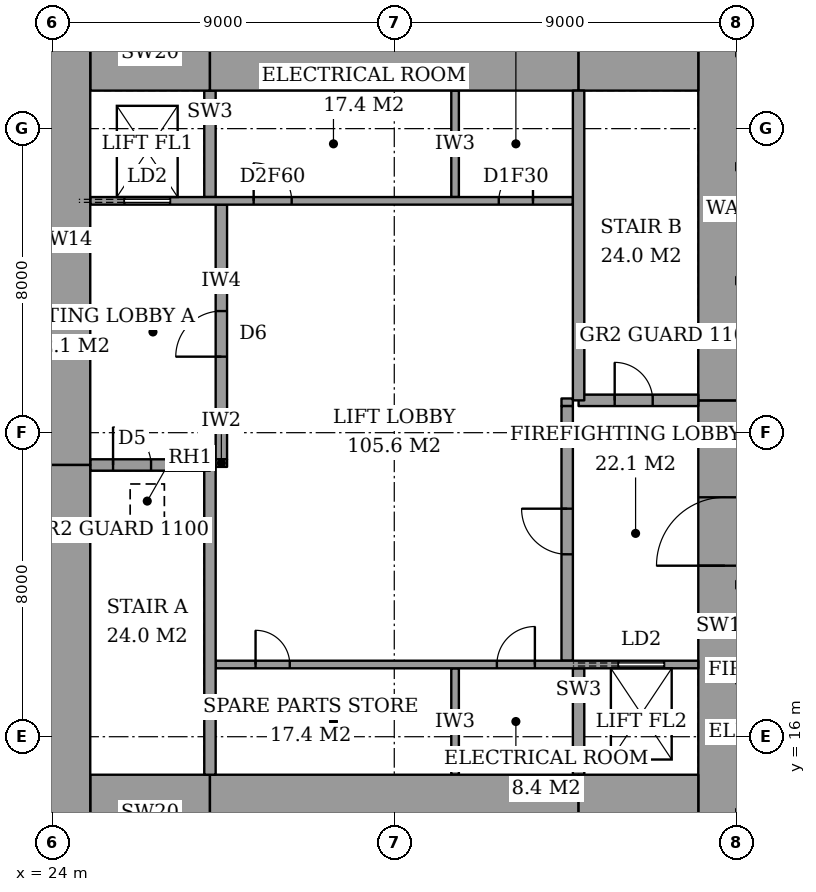
"""IFC4 building model, lengths in metres.
Left out: names, types, materials, properties, quantities, classifications, styles, units other than length and angle.
Written with IfcOpenShell. Run it as: python <this file> out.ifc"""

import sys

from ifc_helpers import new_model, si_unit, direction, frame, frame_2d, origin, origin_2d, place, context, subcontext, project, spatial, rectangle, extrude, element, fill, save


model = new_model("IFC4")
c1 = context("Model", 3, precision=1e-05, world=origin(), true_north=direction((0.0, 1.0)))
c2 = subcontext(c1, "Body", "Model", "MODEL_VIEW")
j1 = project(units=[si_unit("LENGTHUNIT", "METRE"), si_unit("PLANEANGLEUNIT", "RADIAN")], contexts=[c1])
p1 = place(None, origin())
s1 = spatial("IfcSite", under=j1, at=p1, CompositionType="ELEMENT")
p2 = place(p1, origin())
s2 = spatial("IfcBuilding", under=s1, at=p2, CompositionType="ELEMENT")
p3 = place(p2, frame((0.0, 0.0, 296.6)))
s3 = spatial("IfcBuildingStorey", under=s2, at=p3, CompositionType="ELEMENT", Elevation=296.6)
p4 = place(p3, frame((25.0, 14.0, 0.0), z_axis=(0.0, 0.0, 1.0), x_axis=(1.0, 0.0, 0.0)))
e1 = element("IfcWall", 1, at=p4, inside=s3, PredefinedType="SHEAR", context=c2, shape_type="SweptSolid", body=[
    extrude(rectangle(XDim=3.15, YDim=2.0, at=frame_2d((1.575, 0.0))), origin(), (0.0, 0.0, 1.0), 5.0),
])
p5 = place(p3, frame((28.15, 14.0, 0.0), z_axis=(0.0, 0.0, 1.0), x_axis=(1.0, 0.0, 0.0)))
e2 = element("IfcWall", 2, at=p5, inside=s3, PredefinedType="SHEAR", context=c2, shape_type="SweptSolid", body=[
    extrude(rectangle(XDim=9.7, YDim=2.0, at=frame_2d((4.85, 0.0))), origin(), (0.0, 0.0, 1.0), 5.0),
])
for number, where, z_axis, x_axis in (
    (3, (37.85, 14.0, 0.0), (0.0, 0.0, 1.0), (1.0, 0.0, 0.0)),
    (4, (25.0, 34.0, 0.0), (0.0, 0.0, 1.0), (1.0, 0.0, 0.0)),
):
    element("IfcWall", number, at=place(p3, frame(where, z_axis=z_axis, x_axis=x_axis)), inside=s3, PredefinedType="SHEAR", context=c2, shape_type="SweptSolid", body=[
        extrude(rectangle(XDim=3.15, YDim=2.0, at=frame_2d((1.575, 0.0))), origin(), (0.0, 0.0, 1.0), 5.0),
    ])
p6 = place(p3, frame((28.15, 34.0, 0.0), z_axis=(0.0, 0.0, 1.0), x_axis=(1.0, 0.0, 0.0)))
e5 = element("IfcWall", 5, at=p6, inside=s3, PredefinedType="SHEAR", context=c2, shape_type="SweptSolid", body=[
    extrude(rectangle(XDim=9.7, YDim=2.0, at=frame_2d((4.85, 0.0))), origin(), (0.0, 0.0, 1.0), 5.0),
])
p7 = place(p3, frame((37.85, 34.0, 0.0), z_axis=(0.0, 0.0, 1.0), x_axis=(1.0, 0.0, 0.0)))
e6 = element("IfcWall", 6, at=p7, inside=s3, PredefinedType="SHEAR", context=c2, shape_type="SweptSolid", body=[
    extrude(rectangle(XDim=3.15, YDim=2.0, at=frame_2d((1.575, 0.0))), origin(), (0.0, 0.0, 1.0), 5.0),
])
p8 = place(p3, frame((24.3, 13.0, 0.0), z_axis=(0.0, 0.0, 1.0), x_axis=(0.0, 1.0, 0.0)))
e7 = element("IfcWall", 7, at=p8, inside=s3, PredefinedType="SHEAR", context=c2, shape_type="SweptSolid", body=[
    extrude(rectangle(XDim=10.15, YDim=1.4, at=frame_2d((5.075, 0.0))), origin(), (0.0, 0.0, 1.0), 5.0),
])
p9 = place(p3, frame((24.3, 23.15, 0.0), z_axis=(0.0, 0.0, 1.0), x_axis=(0.0, 1.0, 0.0)))
e8 = element("IfcWall", 8, at=p9, inside=s3, PredefinedType="SHEAR", context=c2, shape_type="SweptSolid", body=[
    extrude(rectangle(XDim=11.85, YDim=1.4, at=frame_2d((5.925, 0.0))), origin(), (0.0, 0.0, 1.0), 5.0),
])
p10 = place(p3, frame((41.7, 13.0, 0.0), z_axis=(0.0, 0.0, 1.0), x_axis=(0.0, 1.0, 0.0)))
e9 = element("IfcWall", 9, at=p10, inside=s3, PredefinedType="SHEAR", context=c2, shape_type="SweptSolid", body=[
    extrude(rectangle(XDim=11.85, YDim=1.4, at=frame_2d((5.925, 0.0))), origin(), (0.0, 0.0, 1.0), 5.0),
])
p11 = place(p10, frame((7.5, 0.0, 0.0)))
e10 = element("IfcOpeningElement", 10, at=p11, cuts=e9, PredefinedType="OPENING", context=c2, shape_type="SweptSolid", body=[
    extrude(rectangle(XDim=1.8, YDim=2.4, at=frame_2d((0.9, 1.2))), frame((0.0, 0.71, 0.0), z_axis=(0.0, -1.0, 0.0), x_axis=(1.0, 0.0, 0.0)), (0.0, 0.0, 1.0), 1.42),
])
p12 = place(p3, frame((41.7, 24.85, 0.0), z_axis=(0.0, 0.0, 1.0), x_axis=(0.0, 1.0, 0.0)))
e11 = element("IfcWall", 11, at=p12, inside=s3, PredefinedType="SHEAR", context=c2, shape_type="SweptSolid", body=[
    extrude(rectangle(XDim=10.15, YDim=1.4, at=frame_2d((5.075, 0.0))), origin(), (0.0, 0.0, 1.0), 5.0),
])
p13 = place(p3, frame((28.15, 15.0, 0.0), z_axis=(0.0, 0.0, 1.0), x_axis=(0.0, 1.0, 0.0)))
e12 = element("IfcWall", 12, at=p13, inside=s3, PredefinedType="SHEAR", context=c2, shape_type="SweptSolid", body=[
    extrude(rectangle(XDim=8.15, YDim=0.3, at=frame_2d((4.075, 0.0))), origin(), (0.0, 0.0, 1.0), 5.0),
])
p14 = place(p3, frame((25.0, 23.15, 0.0), z_axis=(0.0, 0.0, 1.0), x_axis=(1.0, 0.0, 0.0)))
e13 = element("IfcWall", 13, at=p14, inside=s3, PredefinedType="SHEAR", context=c2, shape_type="SweptSolid", body=[
    extrude(rectangle(XDim=3.15, YDim=0.3, at=frame_2d((1.575, 0.0))), origin(), (0.0, 0.0, 1.0), 5.0),
])
p15 = place(p14, frame((0.6, 0.0, 0.0)))
e14 = element("IfcOpeningElement", 14, at=p15, cuts=e13, PredefinedType="OPENING", context=c2, shape_type="SweptSolid", body=[
    extrude(rectangle(XDim=1.0, YDim=2.1, at=frame_2d((0.5, 1.05))), frame((0.0, 0.16, 0.0), z_axis=(0.0, -1.0, 0.0), x_axis=(1.0, 0.0, 0.0)), (0.0, 0.0, 1.0), 0.32),
])
p16 = place(p3, frame((37.85, 24.85, 0.0), z_axis=(0.0, 0.0, 1.0), x_axis=(0.0, 1.0, 0.0)))
e15 = element("IfcWall", 15, at=p16, inside=s3, PredefinedType="SHEAR", context=c2, shape_type="SweptSolid", body=[
    extrude(rectangle(XDim=8.15, YDim=0.3, at=frame_2d((4.075, 0.0))), origin(), (0.0, 0.0, 1.0), 5.0),
])
p17 = place(p3, frame((37.85, 24.85, 0.0), z_axis=(0.0, 0.0, 1.0), x_axis=(1.0, 0.0, 0.0)))
e16 = element("IfcWall", 16, at=p17, inside=s3, PredefinedType="SHEAR", context=c2, shape_type="SweptSolid", body=[
    extrude(rectangle(XDim=3.15, YDim=0.3, at=frame_2d((1.575, 0.0))), origin(), (0.0, 0.0, 1.0), 5.0),
])
p18 = place(p17, frame((0.95, 0.0, 0.0)))
e17 = element("IfcOpeningElement", 17, at=p18, cuts=e16, PredefinedType="OPENING", context=c2, shape_type="SweptSolid", body=[
    extrude(rectangle(XDim=1.0, YDim=2.1, at=frame_2d((0.5, 1.05))), frame((0.0, 0.16, 0.0), z_axis=(0.0, -1.0, 0.0), x_axis=(1.0, 0.0, 0.0)), (0.0, 0.0, 1.0), 0.32),
])
p19 = place(p3, frame((28.45, 23.3, 0.0), z_axis=(0.0, 0.0, 1.0), x_axis=(0.0, 1.0, 0.0)))
e18 = element("IfcWall", 18, at=p19, inside=s3, PredefinedType="PARTITIONING", context=c2, shape_type="SweptSolid", body=[
    extrude(rectangle(XDim=6.7, YDim=0.3, at=frame_2d((3.35, 0.0))), origin(), (0.0, 0.0, 1.0), 5.0),
])
p20 = place(p19, frame((2.7, 0.0, 0.0)))
e19 = element("IfcOpeningElement", 19, at=p20, cuts=e18, PredefinedType="OPENING", context=c2, shape_type="SweptSolid", body=[
    extrude(rectangle(XDim=1.2, YDim=2.1, at=frame_2d((0.6, 1.05))), frame((0.0, 0.16, 0.0), z_axis=(0.0, -1.0, 0.0), x_axis=(1.0, 0.0, 0.0)), (0.0, 0.0, 1.0), 0.32),
])
p21 = place(p3, frame((37.55, 18.0, 0.0), z_axis=(0.0, 0.0, 1.0), x_axis=(0.0, 1.0, 0.0)))
e20 = element("IfcWall", 20, at=p21, inside=s3, PredefinedType="PARTITIONING", context=c2, shape_type="SweptSolid", body=[
    extrude(rectangle(XDim=6.7, YDim=0.3, at=frame_2d((3.35, 0.0))), origin(), (0.0, 0.0, 1.0), 5.0),
])
p22 = place(p21, frame((2.8, 0.0, 0.0)))
e21 = element("IfcOpeningElement", 21, at=p22, cuts=e20, PredefinedType="OPENING", context=c2, shape_type="SweptSolid", body=[
    extrude(rectangle(XDim=1.2, YDim=2.1, at=frame_2d((0.6, 1.05))), frame((0.0, 0.16, 0.0), z_axis=(0.0, -1.0, 0.0), x_axis=(1.0, 0.0, 0.0)), (0.0, 0.0, 1.0), 0.32),
])
p23 = place(p3, frame((28.3, 17.9, 0.0), z_axis=(0.0, 0.0, 1.0), x_axis=(1.0, 0.0, 0.0)))
e22 = element("IfcWall", 22, at=p23, inside=s3, PredefinedType="PARTITIONING", context=c2, shape_type="SweptSolid", body=[
    extrude(rectangle(XDim=12.7, YDim=0.2, at=frame_2d((6.35, 0.0))), origin(), (0.0, 0.0, 1.0), 5.0),
])
p24 = place(p23, frame((1.05, 0.0, 0.0)))
e23 = element("IfcOpeningElement", 23, at=p24, cuts=e22, PredefinedType="OPENING", context=c2, shape_type="SweptSolid", body=[
    extrude(rectangle(XDim=0.9, YDim=2.1, at=frame_2d((0.45, 1.05))), frame((0.0, 0.11, 0.0), z_axis=(0.0, -1.0, 0.0), x_axis=(1.0, 0.0, 0.0)), (0.0, 0.0, 1.0), 0.22),
])
p25 = place(p23, frame((7.4, 0.0, 0.0)))
e24 = element("IfcOpeningElement", 24, at=p25, cuts=e22, PredefinedType="OPENING", context=c2, shape_type="SweptSolid", body=[
    extrude(rectangle(XDim=1.0, YDim=2.1, at=frame_2d((0.5, 1.05))), frame((0.0, 0.11, 0.0), z_axis=(0.0, -1.0, 0.0), x_axis=(1.0, 0.0, 0.0)), (0.0, 0.0, 1.0), 0.22),
])
p26 = place(p23, frame((10.6, 0.0, 0.0)))
e25 = element("IfcOpeningElement", 25, at=p26, cuts=e22, PredefinedType="OPENING", context=c2, shape_type="SweptSolid", body=[
    extrude(rectangle(XDim=1.2, YDim=2.1, at=frame_2d((0.6, 1.05))), frame((0.0, 0.11, 0.0), z_axis=(0.0, -1.0, 0.0), x_axis=(1.0, 0.0, 0.0)), (0.0, 0.0, 1.0), 0.22),
])
p27 = place(p3, frame((25.0, 30.1, 0.0), z_axis=(0.0, 0.0, 1.0), x_axis=(1.0, 0.0, 0.0)))
e26 = element("IfcWall", 26, at=p27, inside=s3, PredefinedType="PARTITIONING", context=c2, shape_type="SweptSolid", body=[
    extrude(rectangle(XDim=12.7, YDim=0.2, at=frame_2d((6.35, 0.0))), origin(), (0.0, 0.0, 1.0), 5.0),
])
p28 = place(p27, frame((4.3, 0.0, 0.0)))
e27 = element("IfcOpeningElement", 27, at=p28, cuts=e26, PredefinedType="OPENING", context=c2, shape_type="SweptSolid", body=[
    extrude(rectangle(XDim=1.0, YDim=2.1, at=frame_2d((0.5, 1.05))), frame((0.0, 0.11, 0.0), z_axis=(0.0, -1.0, 0.0), x_axis=(1.0, 0.0, 0.0)), (0.0, 0.0, 1.0), 0.22),
])
p29 = place(p27, frame((10.75, 0.0, 0.0)))
e28 = element("IfcOpeningElement", 28, at=p29, cuts=e26, PredefinedType="OPENING", context=c2, shape_type="SweptSolid", body=[
    extrude(rectangle(XDim=0.9, YDim=2.1, at=frame_2d((0.45, 1.05))), frame((0.0, 0.11, 0.0), z_axis=(0.0, -1.0, 0.0), x_axis=(1.0, 0.0, 0.0)), (0.0, 0.0, 1.0), 0.22),
])
p30 = place(p27, frame((0.9, 0.0, 0.0)))
e29 = element("IfcOpeningElement", 29, at=p30, cuts=e26, PredefinedType="OPENING", context=c2, shape_type="SweptSolid", body=[
    extrude(rectangle(XDim=1.2, YDim=2.1, at=frame_2d((0.6, 1.05))), frame((0.0, 0.11, 0.0), z_axis=(0.0, -1.0, 0.0), x_axis=(1.0, 0.0, 0.0)), (0.0, 0.0, 1.0), 0.22),
])
p31 = place(p3, frame((34.6, 15.0, 0.0), z_axis=(0.0, 0.0, 1.0), x_axis=(0.0, 1.0, 0.0)))
e30 = element("IfcWall", 30, at=p31, inside=s3, PredefinedType="PARTITIONING", context=c2, shape_type="SweptSolid", body=[
    extrude(rectangle(XDim=2.8, YDim=0.2, at=frame_2d((1.4, 0.0))), origin(), (0.0, 0.0, 1.0), 5.0),
])
p32 = place(p3, frame((37.85, 15.0, 0.0), z_axis=(0.0, 0.0, 1.0), x_axis=(0.0, 1.0, 0.0)))
e31 = element("IfcWall", 31, at=p32, inside=s3, PredefinedType="SHEAR", context=c2, shape_type="SweptSolid", body=[
    extrude(rectangle(XDim=2.8, YDim=0.3, at=frame_2d((1.4, 0.0))), origin(), (0.0, 0.0, 1.0), 5.0),
])
p33 = place(p3, frame((34.6, 30.2, 0.0), z_axis=(0.0, 0.0, 1.0), x_axis=(0.0, 1.0, 0.0)))
e32 = element("IfcWall", 32, at=p33, inside=s3, PredefinedType="PARTITIONING", context=c2, shape_type="SweptSolid", body=[
    extrude(rectangle(XDim=2.8, YDim=0.2, at=frame_2d((1.4, 0.0))), origin(), (0.0, 0.0, 1.0), 5.0),
])
p34 = place(p3, frame((28.15, 30.2, 0.0), z_axis=(0.0, 0.0, 1.0), x_axis=(0.0, 1.0, 0.0)))
e33 = element("IfcWall", 33, at=p34, inside=s3, PredefinedType="SHEAR", context=c2, shape_type="SweptSolid", body=[
    extrude(rectangle(XDim=2.8, YDim=0.3, at=frame_2d((1.4, 0.0))), origin(), (0.0, 0.0, 1.0), 5.0),
])
for number, where, z_axis, x_axis in (
    (34, (28.3, 23.2, 0.0), (0.0, 0.0, 1.0), (1.0, 0.0, 0.0)),
    (35, (37.4, 24.8, 0.0), (0.0, 0.0, 1.0), (1.0, 0.0, 0.0)),
):
    element("IfcWall", number, at=place(p3, frame(where, z_axis=z_axis, x_axis=x_axis)), inside=s3, PredefinedType="PARTITIONING", context=c2, shape_type="SweptSolid", body=[
        extrude(rectangle(XDim=0.3, YDim=0.2, at=frame_2d((0.15, 0.0))), origin(), (0.0, 0.0, 1.0), 5.0),
    ])
p35 = place(p15, origin())
e36 = element("IfcDoor", 36, at=p35, inside=s3, OperationType="SINGLE_SWING_RIGHT", PredefinedType="DOOR", context=c2, shape_type="SweptSolid", body=[
    extrude(rectangle(XDim=1.0, YDim=2.1, at=frame_2d((0.5, 1.05))), frame((0.0, 0.025, 0.0), z_axis=(0.0, -1.0, 0.0), x_axis=(1.0, 0.0, 0.0)), (0.0, 0.0, 1.0), 0.05),
])
fill(e14, e36)
p36 = place(p18, origin())
e37 = element("IfcDoor", 37, at=p36, inside=s3, OperationType="SINGLE_SWING_RIGHT", PredefinedType="DOOR", context=c2, shape_type="SweptSolid", body=[
    extrude(rectangle(XDim=1.0, YDim=2.1, at=frame_2d((0.5, 1.05))), frame((0.0, 0.025, 0.0), z_axis=(0.0, -1.0, 0.0), x_axis=(1.0, 0.0, 0.0)), (0.0, 0.0, 1.0), 0.05),
])
fill(e17, e37)
p37 = place(p20, origin())
e38 = element("IfcDoor", 38, at=p37, inside=s3, OperationType="SINGLE_SWING_RIGHT", PredefinedType="DOOR", context=c2, shape_type="SweptSolid", body=[
    extrude(rectangle(XDim=1.2, YDim=2.1, at=frame_2d((0.6, 1.05))), frame((0.0, 0.025, 0.0), z_axis=(0.0, -1.0, 0.0), x_axis=(1.0, 0.0, 0.0)), (0.0, 0.0, 1.0), 0.05),
])
fill(e19, e38)
p38 = place(p22, origin())
e39 = element("IfcDoor", 39, at=p38, inside=s3, OperationType="SINGLE_SWING_LEFT", PredefinedType="DOOR", context=c2, shape_type="SweptSolid", body=[
    extrude(rectangle(XDim=1.2, YDim=2.1, at=frame_2d((0.6, 1.05))), frame((0.0, 0.025, 0.0), z_axis=(0.0, -1.0, 0.0), x_axis=(1.0, 0.0, 0.0)), (0.0, 0.0, 1.0), 0.05),
])
fill(e21, e39)
p39 = place(p11, origin())
e40 = element("IfcDoor", 40, at=p39, inside=s3, OperationType="DOUBLE_DOOR_DOUBLE_SWING", PredefinedType="DOOR", context=c2, shape_type="SweptSolid", body=[
    extrude(rectangle(XDim=1.8, YDim=2.4, at=frame_2d((0.9, 1.2))), frame((0.0, 0.025, 0.0), z_axis=(0.0, -1.0, 0.0), x_axis=(1.0, 0.0, 0.0)), (0.0, 0.0, 1.0), 0.05),
])
fill(e10, e40)
p40 = place(p24, origin())
e41 = element("IfcDoor", 41, at=p40, inside=s3, OperationType="SINGLE_SWING_RIGHT", PredefinedType="DOOR", context=c2, shape_type="SweptSolid", body=[
    extrude(rectangle(XDim=0.9, YDim=2.1, at=frame_2d((0.45, 1.05))), frame((0.0, 0.025, 0.0), z_axis=(0.0, -1.0, 0.0), x_axis=(1.0, 0.0, 0.0)), (0.0, 0.0, 1.0), 0.05),
])
fill(e23, e41)
p41 = place(p25, origin())
e42 = element("IfcDoor", 42, at=p41, inside=s3, OperationType="SINGLE_SWING_LEFT", PredefinedType="DOOR", context=c2, shape_type="SweptSolid", body=[
    extrude(rectangle(XDim=1.0, YDim=2.1, at=frame_2d((0.5, 1.05))), frame((0.0, 0.025, 0.0), z_axis=(0.0, -1.0, 0.0), x_axis=(1.0, 0.0, 0.0)), (0.0, 0.0, 1.0), 0.05),
])
fill(e24, e42)
p42 = place(p28, origin())
e43 = element("IfcDoor", 43, at=p42, inside=s3, OperationType="SINGLE_SWING_RIGHT", PredefinedType="DOOR", context=c2, shape_type="SweptSolid", body=[
    extrude(rectangle(XDim=1.0, YDim=2.1, at=frame_2d((0.5, 1.05))), frame((0.0, 0.025, 0.0), z_axis=(0.0, -1.0, 0.0), x_axis=(1.0, 0.0, 0.0)), (0.0, 0.0, 1.0), 0.05),
])
fill(e27, e43)
p43 = place(p29, origin())
e44 = element("IfcDoor", 44, at=p43, inside=s3, OperationType="SINGLE_SWING_LEFT", PredefinedType="DOOR", context=c2, shape_type="SweptSolid", body=[
    extrude(rectangle(XDim=0.9, YDim=2.1, at=frame_2d((0.45, 1.05))), frame((0.0, 0.025, 0.0), z_axis=(0.0, -1.0, 0.0), x_axis=(1.0, 0.0, 0.0)), (0.0, 0.0, 1.0), 0.05),
])
fill(e28, e44)
p44 = place(p30, origin())
e45 = element("IfcDoor", 45, at=p44, inside=s3, OperationType="SLIDING_TO_LEFT", PredefinedType="DOOR", context=c2, shape_type="SweptSolid", body=[
    extrude(rectangle(XDim=1.2, YDim=2.1, at=frame_2d((0.6, 1.05))), frame((0.0, 0.025, 0.0), z_axis=(0.0, -1.0, 0.0), x_axis=(1.0, 0.0, 0.0)), (0.0, 0.0, 1.0), 0.05),
])
fill(e29, e45)
p45 = place(p26, origin())
e46 = element("IfcDoor", 46, at=p45, inside=s3, OperationType="SLIDING_TO_LEFT", PredefinedType="DOOR", context=c2, shape_type="SweptSolid", body=[
    extrude(rectangle(XDim=1.2, YDim=2.1, at=frame_2d((0.6, 1.05))), frame((0.0, 0.025, 0.0), z_axis=(0.0, -1.0, 0.0), x_axis=(1.0, 0.0, 0.0)), (0.0, 0.0, 1.0), 0.05),
])
fill(e25, e46)
p46 = place(p2, frame((0.0, 0.0, 301.6)))
p47 = place(p46, frame((0.0, 0.0, -0.3)))
p48 = place(p47, frame((26.5, 22.2, 0.0)))
p49 = place(p48, frame((0.0, 0.0, 0.25)))
e47 = element("IfcWindow", 47, at=p49, inside=s3, PartitioningType="SINGLE_PANEL", PredefinedType="SKYLIGHT", context=c2, shape_type="SweptSolid", body=[
    extrude(rectangle(XDim=0.9, YDim=0.9, at=origin_2d()), origin(), (0.0, 0.0, 1.0), 0.05),
])
save(model, sys.argv[1])
